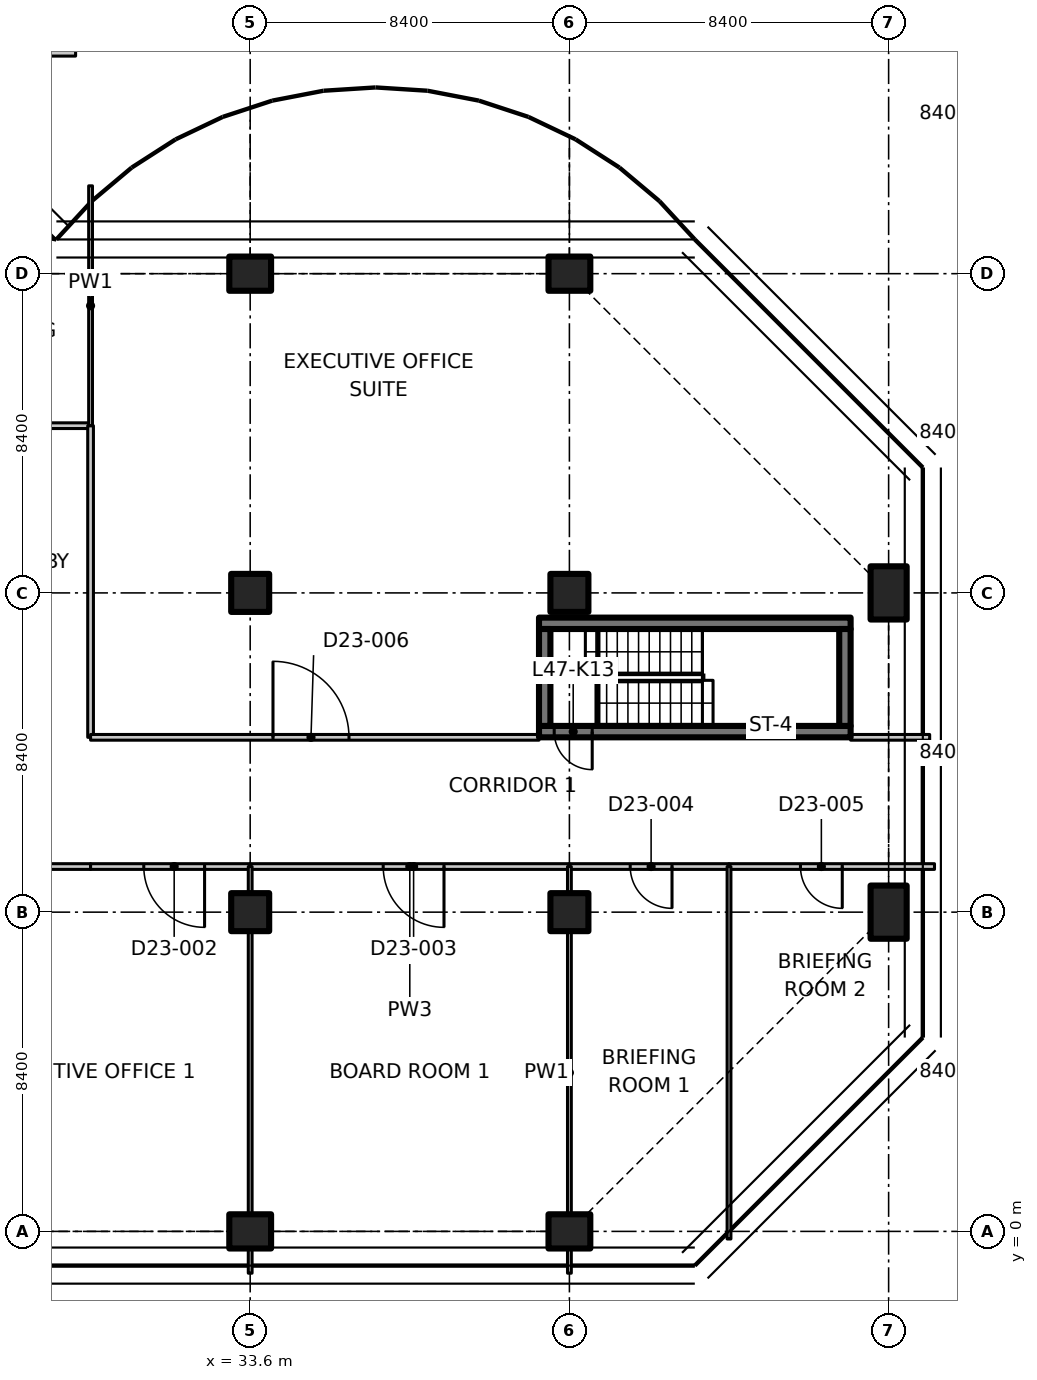
"""IFC4 building model, lengths in metres.
Left out: names, types, materials, properties, quantities, classifications, styles, units other than length and angle.
Written with IfcOpenShell. Run it as: python <this file> out.ifc"""

import sys

from ifc_helpers import new_model, si_unit, direction, frame, frame_2d, origin, origin_2d, place, context, subcontext, project, spatial, polyline, rectangle, outline, extrude, element, fill, save


model = new_model("IFC4")
c1 = context("Model", 3, precision=1e-05, world=origin(), true_north=direction((0.0, 1.0)))
c2 = subcontext(c1, "Body", "Model", "MODEL_VIEW")
j1 = project(units=[si_unit("LENGTHUNIT", "METRE"), si_unit("PLANEANGLEUNIT", "RADIAN")], contexts=[c1])
p1 = place(None, origin())
s1 = spatial("IfcSite", under=j1, at=p1, CompositionType="ELEMENT")
p2 = place(p1, origin())
s2 = spatial("IfcBuilding", under=s1, at=p2, CompositionType="ELEMENT")
p3 = place(p2, frame((0.0, 0.0, 188.4)))
s3 = spatial("IfcBuildingStorey", under=s2, at=p3, CompositionType="ELEMENT", Elevation=188.4)
p4 = place(p3, frame((33.6, 0.0, 0.0), z_axis=(0.0, 0.0, 1.0), x_axis=(0.0, 1.0, 0.0)))
e1 = element("IfcColumn", 1, at=p4, inside=s3, PredefinedType="COLUMN", context=c2, shape_type="SweptSolid", body=[
    extrude(rectangle(XDim=0.9, YDim=1.1, at=origin_2d()), origin(), (0.0, 0.0, 1.0), 3.35),
])
for number, where, z_axis, x_axis in (
    (2, (33.6, 8.4, 0.0), (0.0, 0.0, 1.0), (1.0, 0.0, 0.0)),
    (3, (33.6, 16.8, 0.0), (0.0, 0.0, 1.0), (1.0, 0.0, 0.0)),
):
    element("IfcColumn", number, at=place(p3, frame(where, z_axis=z_axis, x_axis=x_axis)), inside=s3, PredefinedType="COLUMN", context=c2, shape_type="SweptSolid", body=[
        extrude(rectangle(XDim=1.0, YDim=1.0, at=origin_2d()), origin(), (0.0, 0.0, 1.0), 3.35),
    ])
for number, where, z_axis, x_axis in (
    (4, (33.6, 25.2, 0.0), (0.0, 0.0, 1.0), (0.0, 1.0, 0.0)),
    (5, (42.0, 0.0, 0.0), (0.0, 0.0, 1.0), (0.0, 1.0, 0.0)),
):
    element("IfcColumn", number, at=place(p3, frame(where, z_axis=z_axis, x_axis=x_axis)), inside=s3, PredefinedType="COLUMN", context=c2, shape_type="SweptSolid", body=[
        extrude(rectangle(XDim=0.9, YDim=1.1, at=origin_2d()), origin(), (0.0, 0.0, 1.0), 3.35),
    ])
for number, where, z_axis, x_axis in (
    (6, (42.0, 8.4, 0.0), (0.0, 0.0, 1.0), (1.0, 0.0, 0.0)),
    (7, (42.0, 16.8, 0.0), (0.0, 0.0, 1.0), (1.0, 0.0, 0.0)),
):
    element("IfcColumn", number, at=place(p3, frame(where, z_axis=z_axis, x_axis=x_axis)), inside=s3, PredefinedType="COLUMN", context=c2, shape_type="SweptSolid", body=[
        extrude(rectangle(XDim=1.0, YDim=1.0, at=origin_2d()), origin(), (0.0, 0.0, 1.0), 3.35),
    ])
p5 = place(p3, frame((42.0, 25.2, 0.0), z_axis=(0.0, 0.0, 1.0), x_axis=(0.0, 1.0, 0.0)))
e8 = element("IfcColumn", 8, at=p5, inside=s3, PredefinedType="COLUMN", context=c2, shape_type="SweptSolid", body=[
    extrude(rectangle(XDim=0.9, YDim=1.1, at=origin_2d()), origin(), (0.0, 0.0, 1.0), 3.35),
])
for number, where, z_axis, x_axis in (
    (9, (50.4, 8.4, 0.0), (0.0, 0.0, 1.0), (1.0, 0.0, 0.0)),
    (10, (50.4, 16.8, 0.0), (0.0, 0.0, 1.0), (1.0, 0.0, 0.0)),
):
    element("IfcColumn", number, at=place(p3, frame(where, z_axis=z_axis, x_axis=x_axis)), inside=s3, PredefinedType="COLUMN", context=c2, shape_type="SweptSolid", body=[
        extrude(rectangle(XDim=0.95, YDim=1.4, at=origin_2d()), origin(), (0.0, 0.0, 1.0), 3.35),
    ])
p6 = place(p3, frame((49.4, 13.15, 0.0), z_axis=(0.0, 0.0, 1.0), x_axis=(-1.0, 0.0, 0.0)))
e11 = element("IfcWall", 11, at=p6, inside=s3, PredefinedType="SHEAR", context=c2, shape_type="SweptSolid", body=[
    extrude(rectangle(XDim=8.2, YDim=0.3, at=frame_2d((4.1, 0.0))), origin(), (0.0, 0.0, 1.0), 3.35),
])
p7 = place(p6, frame((6.8, 0.0, 0.0)))
e12 = element("IfcOpeningElement", 12, at=p7, cuts=e11, PredefinedType="OPENING", context=c2, shape_type="SweptSolid", body=[
    extrude(rectangle(XDim=1.0, YDim=2.1, at=frame_2d((0.5, 1.05))), frame((0.0, 0.16, 0.0), z_axis=(0.0, -1.0, 0.0), x_axis=(1.0, 0.0, 0.0)), (0.0, 0.0, 1.0), 0.32),
])
p8 = place(p3, frame((41.2, 16.0, 0.0), z_axis=(0.0, 0.0, 1.0), x_axis=(1.0, 0.0, 0.0)))
e13 = element("IfcWall", 13, at=p8, inside=s3, PredefinedType="SHEAR", context=c2, shape_type="SweptSolid", body=[
    extrude(rectangle(XDim=8.2, YDim=0.3, at=frame_2d((4.1, 0.0))), origin(), (0.0, 0.0, 1.0), 3.35),
])
for number, where, z_axis, x_axis in (
    (14, (41.35, 13.3, 0.0), (0.0, 0.0, 1.0), (0.0, 1.0, 0.0)),
    (15, (49.25, 13.3, 0.0), (0.0, 0.0, 1.0), (0.0, 1.0, 0.0)),
):
    element("IfcWall", number, at=place(p3, frame(where, z_axis=z_axis, x_axis=x_axis)), inside=s3, PredefinedType="SHEAR", context=c2, shape_type="SweptSolid", body=[
        extrude(rectangle(XDim=2.55, YDim=0.3, at=frame_2d((1.275, 0.0))), origin(), (0.0, 0.0, 1.0), 3.35),
    ])
for number, where, z_axis, x_axis in (
    (16, (25.2, 21.2, 0.0), (0.0, 0.0, 1.0), (1.0, 0.0, 0.0)),
    (17, (29.4, 9.6, 0.0), (0.0, 0.0, 1.0), (-1.0, 0.0, 0.0)),
):
    element("IfcWall", number, at=place(p3, frame(where, z_axis=z_axis, x_axis=x_axis)), inside=s3, PredefinedType="PARTITIONING", context=c2, shape_type="SweptSolid", body=[
        extrude(rectangle(XDim=4.2, YDim=0.15, at=frame_2d((2.1, 0.0))), origin(), (0.0, 0.0, 1.0), 3.33),
    ])
p9 = place(p3, frame((29.4, 21.2, 0.0), z_axis=(0.0, 0.0, 1.0), x_axis=(0.0, -1.0, 0.0)))
e18 = element("IfcWall", 18, at=p9, inside=s3, PredefinedType="PARTITIONING", context=c2, shape_type="SweptSolid", body=[
    extrude(rectangle(XDim=8.2, YDim=0.15, at=frame_2d((4.1, 0.0))), origin(), (0.0, 0.0, 1.0), 3.33),
])
p10 = place(p3, frame((29.4, 27.511, 0.0), z_axis=(0.0, 0.0, 1.0), x_axis=(0.0, -1.0, 0.0)))
e19 = element("IfcWall", 19, at=p10, inside=s3, PredefinedType="PARTITIONING", context=c2, shape_type="SweptSolid", body=[
    extrude(outline(polyline([(0.0, 0.0), (6.311, 0.0), (6.311, 3.33), (2.761, 3.33), (2.759, 2.98), (1.863, 2.98), (1.861, 3.33), (0.236, 3.33), (0.0, 3.33), (0.0, 0.0)])), frame((0.0, 0.05, 0.0), z_axis=(0.0, -1.0, 0.0), x_axis=(1.0, 0.0, 0.0)), (0.0, 0.0, 1.0), 0.1),
])
p11 = place(p3, frame((25.2, 31.0, 0.0), z_axis=(0.0, 0.0, 1.0), x_axis=(1.0, 0.0, 0.0)))
e20 = element("IfcWall", 20, at=p11, inside=s3, PredefinedType="PARTITIONING", context=c2, shape_type="SweptSolid", body=[
    extrude(rectangle(XDim=3.806, YDim=0.15, at=frame_2d((1.903, 0.0))), origin(), (0.0, 0.0, 1.0), 2.98),
])
p12 = place(p3, frame((33.6, 9.6, 0.0), z_axis=(0.0, 0.0, 1.0), x_axis=(-1.0, 0.0, 0.0)))
e21 = element("IfcWall", 21, at=p12, inside=s3, PredefinedType="PARTITIONING", context=c2, shape_type="SweptSolid", body=[
    extrude(rectangle(XDim=4.2, YDim=0.15, at=frame_2d((2.1, 0.0))), origin(), (0.0, 0.0, 1.0), 3.33),
])
p13 = place(p12, frame((1.2, 0.0, 0.0)))
e22 = element("IfcOpeningElement", 22, at=p13, cuts=e21, PredefinedType="OPENING", context=c2, shape_type="SweptSolid", body=[
    extrude(rectangle(XDim=1.6, YDim=2.1, at=frame_2d((0.8, 1.05))), frame((0.0, 0.085, 0.0), z_axis=(0.0, -1.0, 0.0), x_axis=(1.0, 0.0, 0.0)), (0.0, 0.0, 1.0), 0.17),
])
p14 = place(p3, frame((42.0, 9.6, 0.0), z_axis=(0.0, 0.0, 1.0), x_axis=(-1.0, 0.0, 0.0)))
e23 = element("IfcWall", 23, at=p14, inside=s3, PredefinedType="PARTITIONING", context=c2, shape_type="SweptSolid", body=[
    extrude(rectangle(XDim=8.4, YDim=0.15, at=frame_2d((4.2, 0.0))), origin(), (0.0, 0.0, 1.0), 3.33),
])
p15 = place(p14, frame((3.3, 0.0, 0.0)))
e24 = element("IfcOpeningElement", 24, at=p15, cuts=e23, PredefinedType="OPENING", context=c2, shape_type="SweptSolid", body=[
    extrude(rectangle(XDim=1.6, YDim=2.1, at=frame_2d((0.8, 1.05))), frame((0.0, 0.085, 0.0), z_axis=(0.0, -1.0, 0.0), x_axis=(1.0, 0.0, 0.0)), (0.0, 0.0, 1.0), 0.17),
])
p16 = place(p3, frame((46.2, 9.6, 0.0), z_axis=(0.0, 0.0, 1.0), x_axis=(-1.0, 0.0, 0.0)))
e25 = element("IfcWall", 25, at=p16, inside=s3, PredefinedType="PARTITIONING", context=c2, shape_type="SweptSolid", body=[
    extrude(rectangle(XDim=4.2, YDim=0.15, at=frame_2d((2.1, 0.0))), origin(), (0.0, 0.0, 1.0), 3.33),
])
p17 = place(p16, frame((1.5, 0.0, 0.0)))
e26 = element("IfcOpeningElement", 26, at=p17, cuts=e25, PredefinedType="OPENING", context=c2, shape_type="SweptSolid", body=[
    extrude(rectangle(XDim=1.1, YDim=2.1, at=frame_2d((0.55, 1.05))), frame((0.0, 0.085, 0.0), z_axis=(0.0, -1.0, 0.0), x_axis=(1.0, 0.0, 0.0)), (0.0, 0.0, 1.0), 0.17),
])
p18 = place(p3, frame((51.607, 9.6, 0.0), z_axis=(0.0, 0.0, 1.0), x_axis=(-1.0, 0.0, 0.0)))
e27 = element("IfcWall", 27, at=p18, inside=s3, PredefinedType="PARTITIONING", context=c2, shape_type="SweptSolid", body=[
    extrude(outline(polyline([(0.0, 0.0), (5.407, 0.0), (5.407, 3.33), (1.657, 3.33), (1.655, 2.98), (0.759, 2.98), (0.757, 3.33), (0.127, 3.33), (0.0, 3.33), (0.0, 0.0)])), frame((0.0, 0.075, 0.0), z_axis=(0.0, -1.0, 0.0), x_axis=(1.0, 0.0, 0.0)), (0.0, 0.0, 1.0), 0.15),
])
p19 = place(p18, frame((2.427, 0.0, 0.0)))
e28 = element("IfcOpeningElement", 28, at=p19, cuts=e27, PredefinedType="OPENING", context=c2, shape_type="SweptSolid", body=[
    extrude(rectangle(XDim=1.1, YDim=2.1, at=frame_2d((0.55, 1.05))), frame((0.0, 0.085, 0.0), z_axis=(0.0, -1.0, 0.0), x_axis=(1.0, 0.0, 0.0)), (0.0, 0.0, 1.0), 0.17),
])
p20 = place(p3, frame((29.4, 13.0, 0.0), z_axis=(0.0, 0.0, 1.0), x_axis=(1.0, 0.0, 0.0)))
e29 = element("IfcWall", 29, at=p20, inside=s3, PredefinedType="PARTITIONING", context=c2, shape_type="SweptSolid", body=[
    extrude(rectangle(XDim=11.8, YDim=0.15, at=frame_2d((5.9, 0.0))), origin(), (0.0, 0.0, 1.0), 3.33),
])
p21 = place(p20, frame((4.8, 0.0, 0.0)))
e30 = element("IfcOpeningElement", 30, at=p21, cuts=e29, PredefinedType="OPENING", context=c2, shape_type="SweptSolid", body=[
    extrude(rectangle(XDim=2.0, YDim=2.4, at=frame_2d((1.0, 1.2))), frame((0.0, 0.085, 0.0), z_axis=(0.0, -1.0, 0.0), x_axis=(1.0, 0.0, 0.0)), (0.0, 0.0, 1.0), 0.17),
])
p22 = place(p3, frame((49.4, 13.0, 0.0), z_axis=(0.0, 0.0, 1.0), x_axis=(1.0, 0.0, 0.0)))
e31 = element("IfcWall", 31, at=p22, inside=s3, PredefinedType="PARTITIONING", context=c2, shape_type="SweptSolid", body=[
    extrude(rectangle(XDim=2.08, YDim=0.15, at=frame_2d((1.04, 0.0))), origin(), (0.0, 0.0, 1.0), 2.98),
])
p23 = place(p3, frame((33.6, 9.6, 0.0), z_axis=(0.0, 0.0, 1.0), x_axis=(0.0, -1.0, 0.0)))
e32 = element("IfcWall", 32, at=p23, inside=s3, PredefinedType="PARTITIONING", context=c2, shape_type="SweptSolid", body=[
    extrude(rectangle(XDim=0.68, YDim=0.1, at=frame_2d((0.34, 0.0))), origin(), (0.0, 0.0, 1.0), 3.33),
])
p24 = place(p3, frame((33.6, 7.88, 0.0), z_axis=(0.0, 0.0, 1.0), x_axis=(0.0, -1.0, 0.0)))
e33 = element("IfcWall", 33, at=p24, inside=s3, PredefinedType="PARTITIONING", context=c2, shape_type="SweptSolid", body=[
    extrude(rectangle(XDim=7.41, YDim=0.1, at=frame_2d((3.705, 0.0))), origin(), (0.0, 0.0, 1.0), 3.33),
])
p25 = place(p3, frame((33.6, -0.47, 0.0), z_axis=(0.0, 0.0, 1.0), x_axis=(0.0, -1.0, 0.0)))
e34 = element("IfcWall", 34, at=p25, inside=s3, PredefinedType="PARTITIONING", context=c2, shape_type="SweptSolid", body=[
    extrude(rectangle(XDim=0.63, YDim=0.1, at=frame_2d((0.315, 0.0))), origin(), (0.0, 0.0, 1.0), 3.33),
])
p26 = place(p3, frame((42.0, 9.6, 0.0), z_axis=(0.0, 0.0, 1.0), x_axis=(0.0, -1.0, 0.0)))
e35 = element("IfcWall", 35, at=p26, inside=s3, PredefinedType="PARTITIONING", context=c2, shape_type="SweptSolid", body=[
    extrude(rectangle(XDim=0.68, YDim=0.1, at=frame_2d((0.34, 0.0))), origin(), (0.0, 0.0, 1.0), 3.33),
])
p27 = place(p3, frame((42.0, 7.88, 0.0), z_axis=(0.0, 0.0, 1.0), x_axis=(0.0, -1.0, 0.0)))
e36 = element("IfcWall", 36, at=p27, inside=s3, PredefinedType="PARTITIONING", context=c2, shape_type="SweptSolid", body=[
    extrude(outline(polyline([(0.0, 0.0), (7.41, 0.0), (7.41, 2.98), (7.216, 2.98), (7.214, 3.33), (0.0, 3.33), (0.0, 0.0)])), frame((0.0, 0.05, 0.0), z_axis=(0.0, -1.0, 0.0), x_axis=(1.0, 0.0, 0.0)), (0.0, 0.0, 1.0), 0.1),
])
p28 = place(p3, frame((42.0, -0.47, 0.0), z_axis=(0.0, 0.0, 1.0), x_axis=(0.0, -1.0, 0.0)))
e37 = element("IfcWall", 37, at=p28, inside=s3, PredefinedType="PARTITIONING", context=c2, shape_type="SweptSolid", body=[
    extrude(rectangle(XDim=0.63, YDim=0.1, at=frame_2d((0.315, 0.0))), origin(), (0.0, 0.0, 1.0), 3.33),
])
p29 = place(p3, frame((46.2, 9.6, 0.0), z_axis=(0.0, 0.0, 1.0), x_axis=(0.0, -1.0, 0.0)))
e38 = element("IfcWall", 38, at=p29, inside=s3, PredefinedType="PARTITIONING", context=c2, shape_type="SweptSolid", body=[
    extrude(outline(polyline([(0.0, 0.0), (9.8, 0.0), (9.8, 3.33), (6.066, 3.33), (6.064, 2.98), (4.736, 2.98), (4.734, 3.33), (0.0, 3.33), (0.0, 0.0)])), frame((0.0, 0.05, 0.0), z_axis=(0.0, -1.0, 0.0), x_axis=(1.0, 0.0, 0.0)), (0.0, 0.0, 1.0), 0.1),
])
p30 = place(p7, origin())
e39 = element("IfcDoor", 39, at=p30, inside=s3, OperationType="SINGLE_SWING_LEFT", PredefinedType="DOOR", context=c2, shape_type="SweptSolid", body=[
    extrude(rectangle(XDim=1.0, YDim=2.1, at=frame_2d((0.5, 1.05))), frame((0.0, 0.025, 0.0), z_axis=(0.0, -1.0, 0.0), x_axis=(1.0, 0.0, 0.0)), (0.0, 0.0, 1.0), 0.05),
])
fill(e12, e39)
p31 = place(p13, origin())
e40 = element("IfcDoor", 40, at=p31, inside=s3, OperationType="DOUBLE_DOOR_SINGLE_SWING", PredefinedType="DOOR", context=c2, shape_type="SweptSolid", body=[
    extrude(rectangle(XDim=1.6, YDim=2.1, at=frame_2d((0.8, 1.05))), frame((0.0, 0.025, 0.0), z_axis=(0.0, -1.0, 0.0), x_axis=(1.0, 0.0, 0.0)), (0.0, 0.0, 1.0), 0.05),
])
fill(e22, e40)
p32 = place(p15, origin())
e41 = element("IfcDoor", 41, at=p32, inside=s3, OperationType="DOUBLE_DOOR_SINGLE_SWING", PredefinedType="DOOR", context=c2, shape_type="SweptSolid", body=[
    extrude(rectangle(XDim=1.6, YDim=2.1, at=frame_2d((0.8, 1.05))), frame((0.0, 0.025, 0.0), z_axis=(0.0, -1.0, 0.0), x_axis=(1.0, 0.0, 0.0)), (0.0, 0.0, 1.0), 0.05),
])
fill(e24, e41)
p33 = place(p17, origin())
e42 = element("IfcDoor", 42, at=p33, inside=s3, OperationType="SINGLE_SWING_LEFT", PredefinedType="DOOR", context=c2, shape_type="SweptSolid", body=[
    extrude(rectangle(XDim=1.1, YDim=2.1, at=frame_2d((0.55, 1.05))), frame((0.0, 0.025, 0.0), z_axis=(0.0, -1.0, 0.0), x_axis=(1.0, 0.0, 0.0)), (0.0, 0.0, 1.0), 0.05),
])
fill(e26, e42)
p34 = place(p19, origin())
e43 = element("IfcDoor", 43, at=p34, inside=s3, OperationType="SINGLE_SWING_LEFT", PredefinedType="DOOR", context=c2, shape_type="SweptSolid", body=[
    extrude(rectangle(XDim=1.1, YDim=2.1, at=frame_2d((0.55, 1.05))), frame((0.0, 0.025, 0.0), z_axis=(0.0, -1.0, 0.0), x_axis=(1.0, 0.0, 0.0)), (0.0, 0.0, 1.0), 0.05),
])
fill(e28, e43)
p35 = place(p21, origin())
e44 = element("IfcDoor", 44, at=p35, inside=s3, OperationType="DOUBLE_DOOR_SINGLE_SWING", PredefinedType="DOOR", context=c2, shape_type="SweptSolid", body=[
    extrude(rectangle(XDim=2.0, YDim=2.4, at=frame_2d((1.0, 1.2))), frame((0.0, 0.025, 0.0), z_axis=(0.0, -1.0, 0.0), x_axis=(1.0, 0.0, 0.0)), (0.0, 0.0, 1.0), 0.05),
])
fill(e30, e44)
save(model, sys.argv[1])
